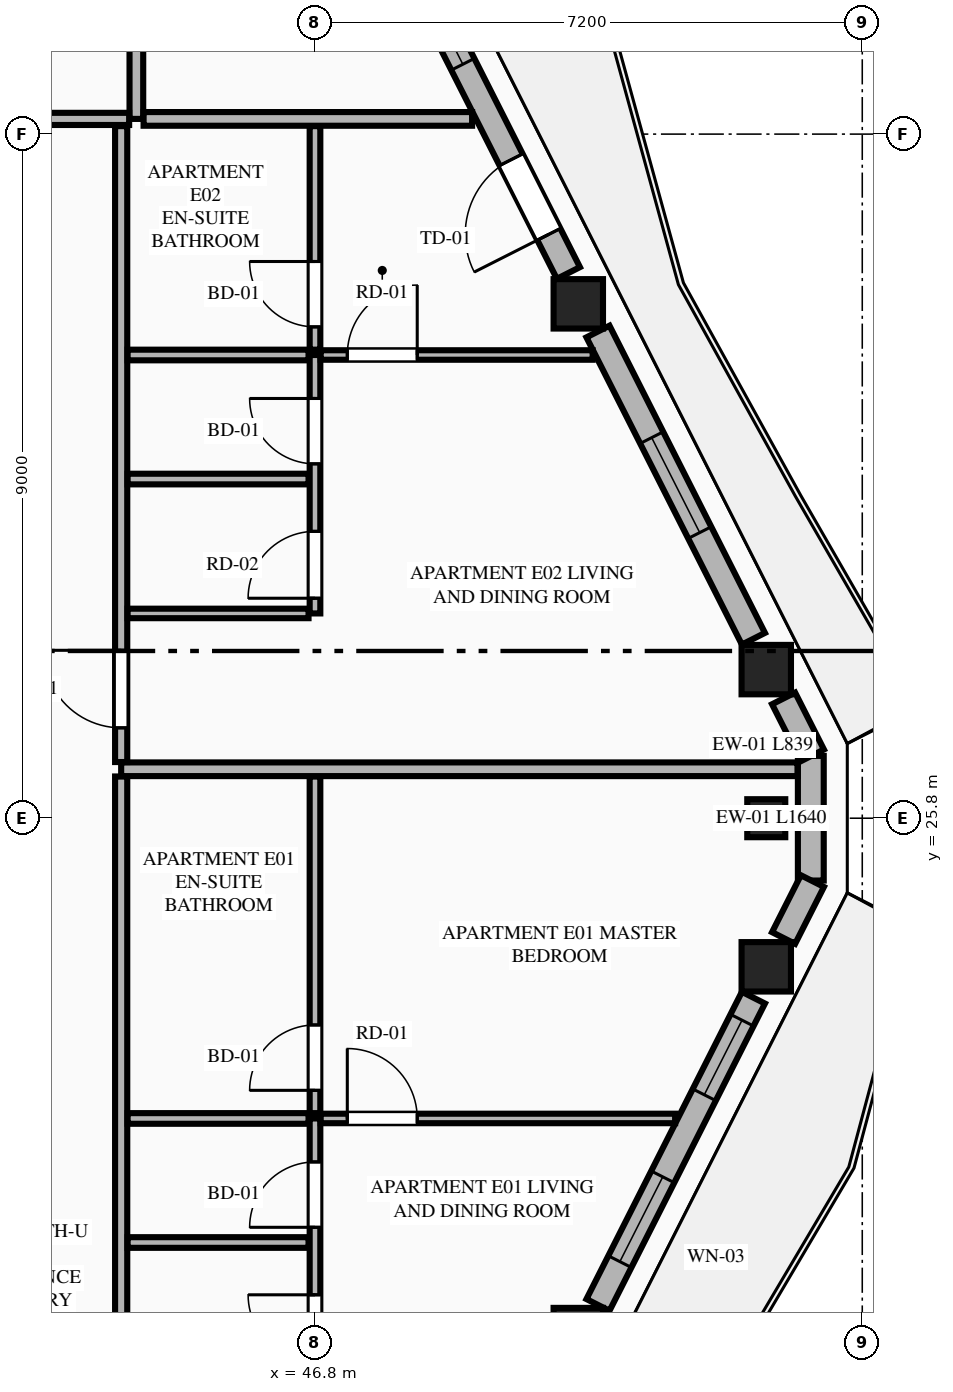
"""IFC4 building model, lengths in metres.
Left out: names, types, materials, properties, quantities, classifications, styles, units other than length and angle.
Written with IfcOpenShell. Run it as: python <this file> out.ifc"""

import sys

from ifc_helpers import new_model, si_unit, direction, frame, frame_2d, origin, origin_2d, place, context, subcontext, project, spatial, rectangle, extrude, element, fill, save


model = new_model("IFC4")
c1 = context("Model", 3, precision=1e-05, world=origin(), true_north=direction((0.0, 1.0)))
c2 = subcontext(c1, "Body", "Model", "MODEL_VIEW")
j1 = project(units=[si_unit("LENGTHUNIT", "METRE"), si_unit("PLANEANGLEUNIT", "RADIAN")], contexts=[c1])
p1 = place(None, origin())
s1 = spatial("IfcSite", under=j1, at=p1, CompositionType="ELEMENT")
p2 = place(p1, origin())
s2 = spatial("IfcBuilding", under=s1, at=p2, CompositionType="ELEMENT")
p3 = place(p2, frame((0.0, 0.0, 259.85)))
s3 = spatial("IfcBuildingStorey", under=s2, at=p3, CompositionType="ELEMENT", Elevation=259.85)
for number, where, z_axis, x_axis in (
    (1, (50.264, 19.033, 0.0), (0.0, 0.0, 1.0), (1.0, 0.0, 0.0)),
    (2, (52.737, 23.845, 0.0), (0.0, 0.0, 1.0), (1.0, 0.0, 0.0)),
    (3, (52.737, 27.755, 0.0), (0.0, 0.0, 1.0), (1.0, 0.0, 0.0)),
    (4, (50.264, 32.567, 0.0), (0.0, 0.0, 1.0), (1.0, 0.0, 0.0)),
):
    element("IfcColumn", number, at=place(p3, frame(where, z_axis=z_axis, x_axis=x_axis)), inside=s3, PredefinedType="COLUMN", context=c2, shape_type="SweptSolid", body=[
        extrude(rectangle(XDim=0.65, YDim=0.65, at=origin_2d()), origin(), (0.0, 0.0, 1.0), 3.65),
    ])
p4 = place(p3, frame((52.737, 25.8, 0.0), z_axis=(0.0, 0.0, 1.0), x_axis=(0.0, 1.0, 0.0)))
e5 = element("IfcColumn", 5, at=p4, inside=s3, PredefinedType="PILASTER", context=c2, shape_type="SweptSolid", body=[
    extrude(rectangle(XDim=0.5, YDim=0.35, at=origin_2d()), origin(), (0.0, 0.0, 1.0), 3.65),
])
p5 = place(p3, frame((53.323, 24.98, 0.0), z_axis=(0.0, 0.0, 1.0), x_axis=(0.0, 1.0, 0.0)))
e6 = element("IfcWall", 6, at=p5, inside=s3, PredefinedType="STANDARD", context=c2, shape_type="SweptSolid", body=[
    extrude(rectangle(XDim=1.64, YDim=0.34, at=frame_2d((0.82, 0.0))), origin(), (0.0, 0.0, 1.0), 3.45),
])
p6 = place(p3, frame((50.523, 19.397, 0.0), z_axis=(0.0, 0.0, 1.0), x_axis=(0.45147697324, 0.892282770558, 0.0)))
e7 = element("IfcWall", 7, at=p6, inside=s3, PredefinedType="STANDARD", context=c2, shape_type="SweptSolid", body=[
    extrude(rectangle(XDim=4.53, YDim=0.34, at=frame_2d((2.265, 0.0))), origin(), (0.0, 0.0, 1.0), 2.983),
])
p7 = place(p6, frame((0.638, 0.0, 0.75)))
e8 = element("IfcOpeningElement", 8, at=p7, cuts=e7, PredefinedType="OPENING", context=c2, shape_type="SweptSolid", body=[
    extrude(rectangle(XDim=1.25, YDim=1.95, at=frame_2d((0.625, 0.975))), frame((0.0, 0.18, 0.0), z_axis=(0.0, -1.0, 0.0), x_axis=(1.0, 0.0, 0.0)), (0.0, 0.0, 1.0), 0.36),
])
p8 = place(p6, frame((3.098, 0.0, 0.75)))
e9 = element("IfcOpeningElement", 9, at=p8, cuts=e7, PredefinedType="OPENING", context=c2, shape_type="SweptSolid", body=[
    extrude(rectangle(XDim=1.1, YDim=2.0, at=frame_2d((0.55, 1.0))), frame((0.0, 0.18, 0.0), z_axis=(0.0, -1.0, 0.0), x_axis=(1.0, 0.0, 0.0)), (0.0, 0.0, 1.0), 0.36),
])
p9 = place(p3, frame((52.965, 24.224, 0.0), z_axis=(0.0, 0.0, 1.0), x_axis=(0.4515140893, 0.892263989615, 0.0)))
e10 = element("IfcWall", 10, at=p9, inside=s3, PredefinedType="STANDARD", context=c2, shape_type="SweptSolid", body=[
    extrude(rectangle(XDim=0.839, YDim=0.34, at=frame_2d((0.419, 0.0))), origin(), (0.0, 0.0, 1.0), 3.45),
])
p10 = place(p3, frame((53.344, 26.627, 0.0), z_axis=(0.0, 0.0, 1.0), x_axis=(-0.45139691133, 0.892323275748, 0.0)))
e11 = element("IfcWall", 11, at=p10, inside=s3, PredefinedType="STANDARD", context=c2, shape_type="SweptSolid", body=[
    extrude(rectangle(XDim=0.839, YDim=0.34, at=frame_2d((0.42, 0.0))), origin(), (0.0, 0.0, 1.0), 3.45),
])
p11 = place(p3, frame((52.568, 28.161, 0.0), z_axis=(0.0, 0.0, 1.0), x_axis=(-0.45147697324, 0.892282770558, 0.0)))
e12 = element("IfcWall", 12, at=p11, inside=s3, PredefinedType="STANDARD", context=c2, shape_type="SweptSolid", body=[
    extrude(rectangle(XDim=4.53, YDim=0.34, at=frame_2d((2.265, 0.0))), origin(), (0.0, 0.0, 1.0), 2.983),
])
p12 = place(p11, frame((1.565, 0.0, 0.75)))
e13 = element("IfcOpeningElement", 13, at=p12, cuts=e12, PredefinedType="OPENING", context=c2, shape_type="SweptSolid", body=[
    extrude(rectangle(XDim=1.4, YDim=2.05, at=frame_2d((0.7, 1.025))), frame((0.0, 0.18, 0.0), z_axis=(0.0, -1.0, 0.0), x_axis=(1.0, 0.0, 0.0)), (0.0, 0.0, 1.0), 0.36),
])
p13 = place(p3, frame((50.134, 32.973, 0.0), z_axis=(0.0, 0.0, 1.0), x_axis=(-0.451447516904, 0.892297674255, 0.0)))
e14 = element("IfcWall", 14, at=p13, inside=s3, PredefinedType="STANDARD", context=c2, shape_type="SweptSolid", body=[
    extrude(rectangle(XDim=4.723, YDim=0.34, at=frame_2d((2.361, 0.0))), origin(), (0.0, 0.0, 1.0), 2.983),
])
p14 = place(p13, frame((0.57, 0.0, 0.0)))
e15 = element("IfcOpeningElement", 15, at=p14, cuts=e14, PredefinedType="OPENING", context=c2, shape_type="SweptSolid", body=[
    extrude(rectangle(XDim=1.1, YDim=2.25, at=frame_2d((0.55, 1.125))), frame((0.0, 0.18, 0.0), z_axis=(0.0, -1.0, 0.0), x_axis=(1.0, 0.0, 0.0)), (0.0, 0.0, 1.0), 0.36),
])
p15 = place(p13, frame((3.077, 0.0, 0.75)))
e16 = element("IfcOpeningElement", 16, at=p15, cuts=e14, PredefinedType="OPENING", context=c2, shape_type="SweptSolid", body=[
    extrude(rectangle(XDim=1.1, YDim=2.0, at=frame_2d((0.55, 1.0))), frame((0.0, 0.18, 0.0), z_axis=(0.0, -1.0, 0.0), x_axis=(1.0, 0.0, 0.0)), (0.0, 0.0, 1.0), 0.36),
])
p16 = place(p3, frame((44.45, 35.0, 0.0), z_axis=(0.0, 0.0, 1.0), x_axis=(0.0, 1.0, 0.0)))
e17 = element("IfcWall", 17, at=p16, inside=s3, PredefinedType="PARTITIONING", context=c2, shape_type="SweptSolid", body=[
    extrude(rectangle(XDim=8.481, YDim=0.18, at=frame_2d((4.24, 0.0))), origin(), (0.0, 0.0, 1.0), 3.45),
])
p17 = place(p3, frame((35.749, 35.0, 0.0), z_axis=(0.0, 0.0, 1.0), x_axis=(1.0, 0.0, 0.0)))
e18 = element("IfcWall", 18, at=p17, inside=s3, PredefinedType="PARTITIONING", context=c2, shape_type="SweptSolid", body=[
    extrude(rectangle(XDim=8.606, YDim=0.16, at=frame_2d((4.303, 0.0))), origin(), (0.0, 0.0, 1.0), 3.45),
])
p18 = place(p17, frame((6.351, 0.0, 0.0)))
e19 = element("IfcOpeningElement", 19, at=p18, cuts=e18, PredefinedType="OPENING", context=c2, shape_type="SweptSolid", body=[
    extrude(rectangle(XDim=1.02, YDim=2.25, at=frame_2d((0.51, 1.125))), frame((0.0, 0.09, 0.0), z_axis=(0.0, -1.0, 0.0), x_axis=(1.0, 0.0, 0.0)), (0.0, 0.0, 1.0), 0.18),
])
p19 = place(p3, frame((44.545, 35.0, 0.0), z_axis=(0.0, 0.0, 1.0), x_axis=(1.0, 0.0, 0.0)))
e20 = element("IfcWall", 20, at=p19, inside=s3, PredefinedType="PARTITIONING", context=c2, shape_type="SweptSolid", body=[
    extrude(rectangle(XDim=4.322, YDim=0.18, at=frame_2d((2.161, 0.0))), origin(), (0.0, 0.0, 1.0), 3.45),
])
p20 = place(p3, frame((44.25, 16.495, 0.0), z_axis=(0.0, 0.0, 1.0), x_axis=(0.0, 1.0, 0.0)))
e21 = element("IfcWall", 21, at=p20, inside=s3, PredefinedType="PARTITIONING", context=c2, shape_type="SweptSolid", body=[
    extrude(rectangle(XDim=9.854, YDim=0.16, at=frame_2d((4.927, 0.0))), origin(), (0.0, 0.0, 1.0), 3.137),
])
p21 = place(p20, frame((0.45, 0.0, 0.0)))
e22 = element("IfcOpeningElement", 22, at=p21, cuts=e21, PredefinedType="OPENING", context=c2, shape_type="SweptSolid", body=[
    extrude(rectangle(XDim=1.02, YDim=2.25, at=frame_2d((0.51, 1.125))), frame((0.0, 0.09, 0.0), z_axis=(0.0, -1.0, 0.0), x_axis=(1.0, 0.0, 0.0)), (0.0, 0.0, 1.0), 0.18),
])
p22 = place(p3, frame((46.8, 18.45, 0.0), z_axis=(0.0, 0.0, 1.0), x_axis=(0.0, 1.0, 0.0)))
e23 = element("IfcWall", 23, at=p22, inside=s3, PredefinedType="PLUMBINGWALL", context=c2, shape_type="SweptSolid", body=[
    extrude(rectangle(XDim=3.4, YDim=0.14, at=frame_2d((1.7, 0.0))), origin(), (0.0, 0.0, 1.0), 3.45),
])
p23 = place(p22, frame((0.2, 0.0, 0.0)))
e24 = element("IfcOpeningElement", 24, at=p23, cuts=e23, PredefinedType="OPENING", context=c2, shape_type="SweptSolid", body=[
    extrude(rectangle(XDim=0.88, YDim=2.15, at=frame_2d((0.44, 1.075))), frame((0.0, 0.08, 0.0), z_axis=(0.0, -1.0, 0.0), x_axis=(1.0, 0.0, 0.0)), (0.0, 0.0, 1.0), 0.16),
])
p24 = place(p22, frame((1.968, 0.0, 0.0)))
e25 = element("IfcOpeningElement", 25, at=p24, cuts=e23, PredefinedType="OPENING", context=c2, shape_type="SweptSolid", body=[
    extrude(rectangle(XDim=0.86, YDim=2.1, at=frame_2d((0.43, 1.05))), frame((0.0, 0.08, 0.0), z_axis=(0.0, -1.0, 0.0), x_axis=(1.0, 0.0, 0.0)), (0.0, 0.0, 1.0), 0.16),
])
p25 = place(p3, frame((46.8, 21.92, 0.0), z_axis=(0.0, 0.0, 1.0), x_axis=(0.0, 1.0, 0.0)))
e26 = element("IfcWall", 26, at=p25, inside=s3, PredefinedType="PLUMBINGWALL", context=c2, shape_type="SweptSolid", body=[
    extrude(rectangle(XDim=4.429, YDim=0.14, at=frame_2d((2.215, 0.0))), origin(), (0.0, 0.0, 1.0), 3.45),
])
p26 = place(p25, frame((0.3, 0.0, 0.0)))
e27 = element("IfcOpeningElement", 27, at=p26, cuts=e26, PredefinedType="OPENING", context=c2, shape_type="SweptSolid", body=[
    extrude(rectangle(XDim=0.86, YDim=2.1, at=frame_2d((0.43, 1.05))), frame((0.0, 0.08, 0.0), z_axis=(0.0, -1.0, 0.0), x_axis=(1.0, 0.0, 0.0)), (0.0, 0.0, 1.0), 0.16),
])
p27 = place(p3, frame((44.335, 21.85, 0.0), z_axis=(0.0, 0.0, 1.0), x_axis=(1.0, 0.0, 0.0)))
e28 = element("IfcWall", 28, at=p27, inside=s3, PredefinedType="PLUMBINGWALL", context=c2, shape_type="SweptSolid", body=[
    extrude(rectangle(XDim=2.38, YDim=0.14, at=frame_2d((1.19, 0.0))), origin(), (0.0, 0.0, 1.0), 3.45),
])
p28 = place(p3, frame((46.875, 21.85, 0.0), z_axis=(0.0, 0.0, 1.0), x_axis=(1.0, 0.0, 0.0)))
e29 = element("IfcWall", 29, at=p28, inside=s3, PredefinedType="PARTITIONING", context=c2, shape_type="SweptSolid", body=[
    extrude(rectangle(XDim=4.663, YDim=0.125, at=frame_2d((2.332, 0.0))), origin(), (0.0, 0.0, 1.0), 3.45),
])
p29 = place(p28, frame((0.35, 0.0, 0.0)))
e30 = element("IfcOpeningElement", 30, at=p29, cuts=e29, PredefinedType="OPENING", context=c2, shape_type="SweptSolid", body=[
    extrude(rectangle(XDim=0.92, YDim=2.15, at=frame_2d((0.46, 1.075))), frame((0.0, 0.073, 0.0), z_axis=(0.0, -1.0, 0.0), x_axis=(1.0, 0.0, 0.0)), (0.0, 0.0, 1.0), 0.145),
])
p30 = place(p3, frame((44.335, 20.218, 0.0), z_axis=(0.0, 0.0, 1.0), x_axis=(1.0, 0.0, 0.0)))
e31 = element("IfcWall", 31, at=p30, inside=s3, PredefinedType="PLUMBINGWALL", context=c2, shape_type="SweptSolid", body=[
    extrude(rectangle(XDim=2.38, YDim=0.14, at=frame_2d((1.19, 0.0))), origin(), (0.0, 0.0, 1.0), 3.45),
])
p31 = place(p3, frame((44.25, 26.444, 0.0), z_axis=(0.0, 0.0, 1.0), x_axis=(1.0, 0.0, 0.0)))
e32 = element("IfcWall", 32, at=p31, inside=s3, PredefinedType="PARTITIONING", context=c2, shape_type="SweptSolid", body=[
    extrude(rectangle(XDim=8.898, YDim=0.18, at=frame_2d((4.449, 0.0))), origin(), (0.0, 0.0, 1.0), 3.45),
])
p32 = place(p3, frame((44.25, 26.539, 0.0), z_axis=(0.0, 0.0, 1.0), x_axis=(0.0, 1.0, 0.0)))
e33 = element("IfcWall", 33, at=p32, inside=s3, PredefinedType="PARTITIONING", context=c2, shape_type="SweptSolid", body=[
    extrude(rectangle(XDim=8.366, YDim=0.16, at=frame_2d((4.183, 0.0))), origin(), (0.0, 0.0, 1.0), 3.137),
])
p33 = place(p32, frame((0.45, 0.0, 0.0)))
e34 = element("IfcOpeningElement", 34, at=p33, cuts=e33, PredefinedType="OPENING", context=c2, shape_type="SweptSolid", body=[
    extrude(rectangle(XDim=1.02, YDim=2.25, at=frame_2d((0.51, 1.125))), frame((0.0, 0.09, 0.0), z_axis=(0.0, -1.0, 0.0), x_axis=(1.0, 0.0, 0.0)), (0.0, 0.0, 1.0), 0.18),
])
p34 = place(p3, frame((44.335, 28.494, 0.0), z_axis=(0.0, 0.0, 1.0), x_axis=(1.0, 0.0, 0.0)))
e35 = element("IfcWall", 35, at=p34, inside=s3, PredefinedType="PARTITIONING", context=c2, shape_type="SweptSolid", body=[
    extrude(rectangle(XDim=2.38, YDim=0.125, at=frame_2d((1.19, 0.0))), origin(), (0.0, 0.0, 1.0), 3.45),
])
p35 = place(p3, frame((46.8, 28.494, 0.0), z_axis=(0.0, 0.0, 1.0), x_axis=(0.0, 1.0, 0.0)))
e36 = element("IfcWall", 36, at=p35, inside=s3, PredefinedType="PLUMBINGWALL", context=c2, shape_type="SweptSolid", body=[
    extrude(rectangle(XDim=3.4, YDim=0.14, at=frame_2d((1.7, 0.0))), origin(), (0.0, 0.0, 1.0), 3.45),
])
p36 = place(p35, frame((0.2, 0.0, 0.0)))
e37 = element("IfcOpeningElement", 37, at=p36, cuts=e36, PredefinedType="OPENING", context=c2, shape_type="SweptSolid", body=[
    extrude(rectangle(XDim=0.88, YDim=2.15, at=frame_2d((0.44, 1.075))), frame((0.0, 0.08, 0.0), z_axis=(0.0, -1.0, 0.0), x_axis=(1.0, 0.0, 0.0)), (0.0, 0.0, 1.0), 0.16),
])
p37 = place(p35, frame((1.968, 0.0, 0.0)))
e38 = element("IfcOpeningElement", 38, at=p37, cuts=e36, PredefinedType="OPENING", context=c2, shape_type="SweptSolid", body=[
    extrude(rectangle(XDim=0.86, YDim=2.1, at=frame_2d((0.43, 1.05))), frame((0.0, 0.08, 0.0), z_axis=(0.0, -1.0, 0.0), x_axis=(1.0, 0.0, 0.0)), (0.0, 0.0, 1.0), 0.16),
])
p38 = place(p3, frame((46.8, 31.964, 0.0), z_axis=(0.0, 0.0, 1.0), x_axis=(0.0, 1.0, 0.0)))
e39 = element("IfcWall", 39, at=p38, inside=s3, PredefinedType="PLUMBINGWALL", context=c2, shape_type="SweptSolid", body=[
    extrude(rectangle(XDim=2.941, YDim=0.14, at=frame_2d((1.47, 0.0))), origin(), (0.0, 0.0, 1.0), 3.45),
])
p39 = place(p38, frame((0.3, 0.0, 0.0)))
e40 = element("IfcOpeningElement", 40, at=p39, cuts=e39, PredefinedType="OPENING", context=c2, shape_type="SweptSolid", body=[
    extrude(rectangle(XDim=0.86, YDim=2.1, at=frame_2d((0.43, 1.05))), frame((0.0, 0.08, 0.0), z_axis=(0.0, -1.0, 0.0), x_axis=(1.0, 0.0, 0.0)), (0.0, 0.0, 1.0), 0.16),
])
p40 = place(p3, frame((44.335, 31.894, 0.0), z_axis=(0.0, 0.0, 1.0), x_axis=(1.0, 0.0, 0.0)))
e41 = element("IfcWall", 41, at=p40, inside=s3, PredefinedType="PLUMBINGWALL", context=c2, shape_type="SweptSolid", body=[
    extrude(rectangle(XDim=2.38, YDim=0.14, at=frame_2d((1.19, 0.0))), origin(), (0.0, 0.0, 1.0), 3.45),
])
p41 = place(p3, frame((46.875, 31.894, 0.0), z_axis=(0.0, 0.0, 1.0), x_axis=(1.0, 0.0, 0.0)))
e42 = element("IfcWall", 42, at=p41, inside=s3, PredefinedType="PARTITIONING", context=c2, shape_type="SweptSolid", body=[
    extrude(rectangle(XDim=3.578, YDim=0.125, at=frame_2d((1.789, 0.0))), origin(), (0.0, 0.0, 1.0), 3.45),
])
p42 = place(p41, frame((0.35, 0.0, 0.0)))
e43 = element("IfcOpeningElement", 43, at=p42, cuts=e42, PredefinedType="OPENING", context=c2, shape_type="SweptSolid", body=[
    extrude(rectangle(XDim=0.92, YDim=2.15, at=frame_2d((0.46, 1.075))), frame((0.0, 0.073, 0.0), z_axis=(0.0, -1.0, 0.0), x_axis=(1.0, 0.0, 0.0)), (0.0, 0.0, 1.0), 0.145),
])
p43 = place(p3, frame((44.335, 30.262, 0.0), z_axis=(0.0, 0.0, 1.0), x_axis=(1.0, 0.0, 0.0)))
e44 = element("IfcWall", 44, at=p43, inside=s3, PredefinedType="PLUMBINGWALL", context=c2, shape_type="SweptSolid", body=[
    extrude(rectangle(XDim=2.38, YDim=0.14, at=frame_2d((1.19, 0.0))), origin(), (0.0, 0.0, 1.0), 3.45),
])
p44 = place(p7, origin())
e45 = element("IfcWindow", 45, at=p44, inside=s3, PartitioningType="SINGLE_PANEL", PredefinedType="WINDOW", context=c2, shape_type="SweptSolid", body=[
    extrude(rectangle(XDim=1.25, YDim=1.95, at=frame_2d((0.625, 0.975))), frame((0.0, 0.03, 0.0), z_axis=(0.0, -1.0, 0.0), x_axis=(1.0, 0.0, 0.0)), (0.0, 0.0, 1.0), 0.06),
])
fill(e8, e45)
p45 = place(p12, origin())
e46 = element("IfcWindow", 46, at=p45, inside=s3, PartitioningType="SINGLE_PANEL", PredefinedType="WINDOW", context=c2, shape_type="SweptSolid", body=[
    extrude(rectangle(XDim=1.4, YDim=2.05, at=frame_2d((0.7, 1.025))), frame((0.0, 0.03, 0.0), z_axis=(0.0, -1.0, 0.0), x_axis=(1.0, 0.0, 0.0)), (0.0, 0.0, 1.0), 0.06),
])
fill(e13, e46)
p46 = place(p14, origin())
e47 = element("IfcDoor", 47, at=p46, inside=s3, OperationType="SINGLE_SWING_LEFT", PredefinedType="DOOR", context=c2, shape_type="SweptSolid", body=[
    extrude(rectangle(XDim=1.1, YDim=2.25, at=frame_2d((0.55, 1.125))), frame((0.0, 0.025, 0.0), z_axis=(0.0, -1.0, 0.0), x_axis=(1.0, 0.0, 0.0)), (0.0, 0.0, 1.0), 0.05),
])
fill(e15, e47)
p47 = place(p23, origin())
e48 = element("IfcDoor", 48, at=p47, inside=s3, OperationType="SINGLE_SWING_RIGHT", PredefinedType="DOOR", context=c2, shape_type="SweptSolid", body=[
    extrude(rectangle(XDim=0.88, YDim=2.15, at=frame_2d((0.44, 1.075))), frame((0.0, 0.025, 0.0), z_axis=(0.0, -1.0, 0.0), x_axis=(1.0, 0.0, 0.0)), (0.0, 0.0, 1.0), 0.05),
])
fill(e24, e48)
p48 = place(p24, origin())
e49 = element("IfcDoor", 49, at=p48, inside=s3, OperationType="SINGLE_SWING_LEFT", PredefinedType="DOOR", context=c2, shape_type="SweptSolid", body=[
    extrude(rectangle(XDim=0.86, YDim=2.1, at=frame_2d((0.43, 1.05))), frame((0.0, 0.025, 0.0), z_axis=(0.0, -1.0, 0.0), x_axis=(1.0, 0.0, 0.0)), (0.0, 0.0, 1.0), 0.05),
])
fill(e25, e49)
p49 = place(p26, origin())
e50 = element("IfcDoor", 50, at=p49, inside=s3, OperationType="SINGLE_SWING_LEFT", PredefinedType="DOOR", context=c2, shape_type="SweptSolid", body=[
    extrude(rectangle(XDim=0.86, YDim=2.1, at=frame_2d((0.43, 1.05))), frame((0.0, 0.025, 0.0), z_axis=(0.0, -1.0, 0.0), x_axis=(1.0, 0.0, 0.0)), (0.0, 0.0, 1.0), 0.05),
])
fill(e27, e50)
p50 = place(p29, origin())
e51 = element("IfcDoor", 51, at=p50, inside=s3, OperationType="SINGLE_SWING_LEFT", PredefinedType="DOOR", context=c2, shape_type="SweptSolid", body=[
    extrude(rectangle(XDim=0.92, YDim=2.15, at=frame_2d((0.46, 1.075))), frame((0.0, 0.025, 0.0), z_axis=(0.0, -1.0, 0.0), x_axis=(1.0, 0.0, 0.0)), (0.0, 0.0, 1.0), 0.05),
])
fill(e30, e51)
p51 = place(p36, origin())
e52 = element("IfcDoor", 52, at=p51, inside=s3, OperationType="SINGLE_SWING_LEFT", PredefinedType="DOOR", context=c2, shape_type="SweptSolid", body=[
    extrude(rectangle(XDim=0.88, YDim=2.15, at=frame_2d((0.44, 1.075))), frame((0.0, 0.025, 0.0), z_axis=(0.0, -1.0, 0.0), x_axis=(1.0, 0.0, 0.0)), (0.0, 0.0, 1.0), 0.05),
])
fill(e37, e52)
p52 = place(p37, origin())
e53 = element("IfcDoor", 53, at=p52, inside=s3, OperationType="SINGLE_SWING_RIGHT", PredefinedType="DOOR", context=c2, shape_type="SweptSolid", body=[
    extrude(rectangle(XDim=0.86, YDim=2.1, at=frame_2d((0.43, 1.05))), frame((0.0, 0.025, 0.0), z_axis=(0.0, -1.0, 0.0), x_axis=(1.0, 0.0, 0.0)), (0.0, 0.0, 1.0), 0.05),
])
fill(e38, e53)
p53 = place(p39, origin())
e54 = element("IfcDoor", 54, at=p53, inside=s3, OperationType="SINGLE_SWING_RIGHT", PredefinedType="DOOR", context=c2, shape_type="SweptSolid", body=[
    extrude(rectangle(XDim=0.86, YDim=2.1, at=frame_2d((0.43, 1.05))), frame((0.0, 0.025, 0.0), z_axis=(0.0, -1.0, 0.0), x_axis=(1.0, 0.0, 0.0)), (0.0, 0.0, 1.0), 0.05),
])
fill(e40, e54)
p54 = place(p33, origin())
e55 = element("IfcDoor", 55, at=p54, inside=s3, OperationType="SINGLE_SWING_RIGHT", PredefinedType="DOOR", context=c2, shape_type="SweptSolid", body=[
    extrude(rectangle(XDim=1.02, YDim=2.25, at=frame_2d((0.51, 1.125))), frame((0.0, 0.025, 0.0), z_axis=(0.0, -1.0, 0.0), x_axis=(1.0, 0.0, 0.0)), (0.0, 0.0, 1.0), 0.05),
])
fill(e34, e55)
p55 = place(p42, origin())
e56 = element("IfcDoor", 56, at=p55, inside=s3, OperationType="SINGLE_SWING_RIGHT", PredefinedType="DOOR", context=c2, shape_type="SweptSolid", body=[
    extrude(rectangle(XDim=0.92, YDim=2.15, at=frame_2d((0.46, 1.075))), frame((0.0, 0.025, 0.0), z_axis=(0.0, -1.0, 0.0), x_axis=(1.0, 0.0, 0.0)), (0.0, 0.0, 1.0), 0.05),
])
fill(e43, e56)
p56 = place(p8, origin())
e57 = element("IfcWindow", 57, at=p56, inside=s3, PartitioningType="SINGLE_PANEL", PredefinedType="WINDOW", context=c2, shape_type="SweptSolid", body=[
    extrude(rectangle(XDim=1.1, YDim=2.0, at=frame_2d((0.55, 1.0))), frame((0.0, 0.03, 0.0), z_axis=(0.0, -1.0, 0.0), x_axis=(1.0, 0.0, 0.0)), (0.0, 0.0, 1.0), 0.06),
])
fill(e9, e57)
p57 = place(p15, origin())
e58 = element("IfcWindow", 58, at=p57, inside=s3, PartitioningType="SINGLE_PANEL", PredefinedType="WINDOW", context=c2, shape_type="SweptSolid", body=[
    extrude(rectangle(XDim=1.1, YDim=2.0, at=frame_2d((0.55, 1.0))), frame((0.0, 0.03, 0.0), z_axis=(0.0, -1.0, 0.0), x_axis=(1.0, 0.0, 0.0)), (0.0, 0.0, 1.0), 0.06),
])
fill(e16, e58)
save(model, sys.argv[1])
